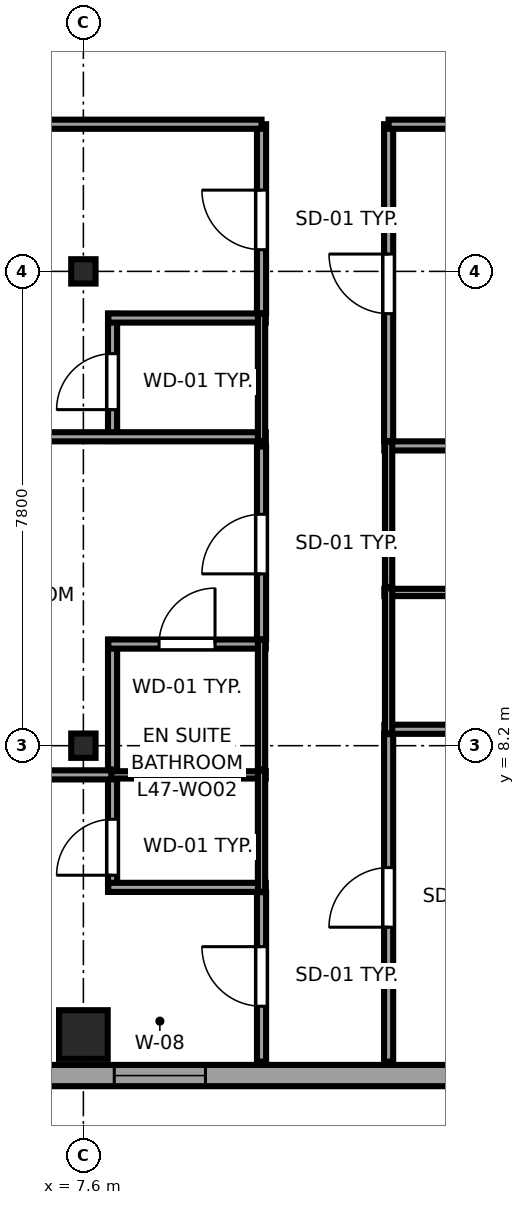
"""IFC4 building model, lengths in metres.
Left out: names, types, materials, properties, quantities, classifications, styles, units other than length and angle.
Written with IfcOpenShell. Run it as: python <this file> out.ifc"""

import sys

from ifc_helpers import new_model, si_unit, direction, frame, frame_2d, origin, origin_2d, place, context, subcontext, project, spatial, rectangle, i_section, extrude, source, transform, mapped, element, fill, save


model = new_model("IFC4")
c1 = context("Model", 3, precision=1e-05, world=origin(), true_north=direction((0.0, 1.0)))
c2 = subcontext(c1, "Body", "Model", "MODEL_VIEW")
j1 = project(units=[si_unit("LENGTHUNIT", "METRE"), si_unit("PLANEANGLEUNIT", "RADIAN")], contexts=[c1])
p1 = place(None, origin())
s1 = spatial("IfcSite", under=j1, at=p1, CompositionType="ELEMENT")
p2 = place(p1, origin())
s2 = spatial("IfcBuilding", under=s1, at=p2, CompositionType="ELEMENT")
p3 = place(p2, frame((0.0, 0.0, 179.0)))
s3 = spatial("IfcBuildingStorey", under=s2, at=p3, CompositionType="ELEMENT", Elevation=179.0)
m1 = source(origin(), c2, "Body", "SweptSolid", [
    extrude(rectangle(XDim=0.8, YDim=0.8, at=origin_2d()), origin(), (0.0, 0.0, 1.0), 3.55),
])
p4 = place(p3, frame((7.6, 3.45, 0.0), z_axis=(0.0, 0.0, 1.0), x_axis=(1.0, 0.0, 0.0)))
e1 = element("IfcColumn", 1, at=p4, inside=s3, PredefinedType="COLUMN", context=c2, shape_type="MappedRepresentation", body=[
    mapped(m1, transform((0.0, 0.0, 0.0), x_axis=(1.0, 0.0, 0.0), y_axis=(0.0, 1.0, 0.0), z_axis=(0.0, 0.0, 1.0), scale=1.0)),
])
m2 = source(origin(), c2, "Body", "SweptSolid", [
    extrude(i_section(OverallWidth=0.4, OverallDepth=0.4, WebThickness=0.02, FlangeThickness=0.035, at=origin_2d()), origin(), (0.0, 0.0, 1.0), 3.55),
])
for number, where, z_axis, x_axis in (
    (2, (7.6, 8.2, 0.0), (0.0, 0.0, 1.0), (1.0, 0.0, 0.0)),
    (3, (7.6, 16.0, 0.0), (0.0, 0.0, 1.0), (1.0, 0.0, 0.0)),
):
    element("IfcColumn", number, at=place(p3, frame(where, z_axis=z_axis, x_axis=x_axis)), inside=s3, PredefinedType="COLUMN", context=c2, shape_type="MappedRepresentation", body=[
        mapped(m2, transform((0.0, 0.0, 0.0), x_axis=(1.0, 0.0, 0.0), y_axis=(0.0, 1.0, 0.0), z_axis=(0.0, 0.0, 1.0), scale=1.0)),
    ])
p5 = place(p3, frame((7.017, 2.775, 0.0), z_axis=(0.0, 0.0, 1.0), x_axis=(1.0, 0.0, 0.0)))
e4 = element("IfcWall", 4, at=p5, inside=s3, PredefinedType="SOLIDWALL", context=c2, shape_type="SweptSolid", body=[
    extrude(rectangle(XDim=15.608, YDim=0.35, at=frame_2d((7.804, 0.0))), origin(), (0.0, 0.0, 1.0), 3.25),
])
p6 = place(p5, frame((11.407, 0.0, 0.68)))
e5 = element("IfcOpeningElement", 5, at=p6, cuts=e4, PredefinedType="OPENING", context=c2, shape_type="SweptSolid", body=[
    extrude(rectangle(XDim=2.4, YDim=1.9, at=frame_2d((1.2, 0.95))), frame((0.0, 0.185, 0.0), z_axis=(0.0, -1.0, 0.0), x_axis=(1.0, 0.0, 0.0)), (0.0, 0.0, 1.0), 0.37),
])
p7 = place(p5, frame((1.091, 0.0, 0.62)))
e6 = element("IfcOpeningElement", 6, at=p7, cuts=e4, PredefinedType="OPENING", context=c2, shape_type="SweptSolid", body=[
    extrude(rectangle(XDim=1.5, YDim=1.55, at=frame_2d((0.75, 0.775))), frame((0.0, 0.185, 0.0), z_axis=(0.0, -1.0, 0.0), x_axis=(1.0, 0.0, 0.0)), (0.0, 0.0, 1.0), 0.37),
])
p8 = place(p3, frame((8.08, 5.8, 0.0), z_axis=(0.0, 0.0, 1.0), x_axis=(0.0, 1.0, 0.0)))
e7 = element("IfcWall", 7, at=p8, inside=s3, PredefinedType="PARTITIONING", context=c2, shape_type="SweptSolid", body=[
    extrude(rectangle(XDim=1.99, YDim=0.15, at=frame_2d((0.995, 0.0))), origin(), (0.0, 0.0, 1.0), 3.25),
])
p9 = place(p8, frame((0.27, 0.0, 0.0)))
e8 = element("IfcOpeningElement", 8, at=p9, cuts=e7, PredefinedType="OPENING", context=c2, shape_type="SweptSolid", body=[
    extrude(rectangle(XDim=0.92, YDim=2.01, at=frame_2d((0.46, 1.005))), frame((0.0, 0.085, 0.0), z_axis=(0.0, -1.0, 0.0), x_axis=(1.0, 0.0, 0.0)), (0.0, 0.0, 1.0), 0.17),
])
p10 = place(p3, frame((8.01, 5.87, 0.0), z_axis=(0.0, 0.0, 1.0), x_axis=(1.0, 0.0, 0.0)))
e9 = element("IfcWall", 9, at=p10, inside=s3, PredefinedType="PARTITIONING", context=c2, shape_type="SweptSolid", body=[
    extrude(rectangle(XDim=2.59, YDim=0.15, at=frame_2d((1.295, 0.0))), origin(), (0.0, 0.0, 1.0), 3.25),
])
p11 = place(p3, frame((8.01, 7.72, 0.0), z_axis=(0.0, 0.0, 1.0), x_axis=(1.0, 0.0, 0.0)))
e10 = element("IfcWall", 10, at=p11, inside=s3, PredefinedType="PLUMBINGWALL", context=c2, shape_type="SweptSolid", body=[
    extrude(rectangle(XDim=2.59, YDim=0.12, at=frame_2d((1.295, 0.0))), origin(), (0.0, 0.0, 1.0), 3.25),
])
p12 = place(p3, frame((10.53, 5.8, 0.0), z_axis=(0.0, 0.0, 1.0), x_axis=(0.0, 1.0, 0.0)))
e11 = element("IfcWall", 11, at=p12, inside=s3, PredefinedType="PLUMBINGWALL", context=c2, shape_type="SweptSolid", body=[
    extrude(rectangle(XDim=1.99, YDim=0.12, at=frame_2d((0.995, 0.0))), origin(), (0.0, 0.0, 1.0), 3.25),
])
p13 = place(p3, frame((8.08, 7.81, 0.0), z_axis=(0.0, 0.0, 1.0), x_axis=(0.0, 1.0, 0.0)))
e12 = element("IfcWall", 12, at=p13, inside=s3, PredefinedType="PARTITIONING", context=c2, shape_type="SweptSolid", body=[
    extrude(rectangle(XDim=2.131, YDim=0.15, at=frame_2d((1.065, 0.0))), origin(), (0.0, 0.0, 1.0), 3.25),
])
p14 = place(p3, frame((8.01, 9.871, 0.0), z_axis=(0.0, 0.0, 1.0), x_axis=(1.0, 0.0, 0.0)))
e13 = element("IfcWall", 13, at=p14, inside=s3, PredefinedType="PARTITIONING", context=c2, shape_type="SweptSolid", body=[
    extrude(rectangle(XDim=2.59, YDim=0.15, at=frame_2d((1.295, 0.0))), origin(), (0.0, 0.0, 1.0), 3.25),
])
p15 = place(p14, frame((0.835, 0.0, 0.0)))
e14 = element("IfcOpeningElement", 14, at=p15, cuts=e13, PredefinedType="OPENING", context=c2, shape_type="SweptSolid", body=[
    extrude(rectangle(XDim=0.92, YDim=2.01, at=frame_2d((0.46, 1.005))), frame((0.0, 0.085, 0.0), z_axis=(0.0, -1.0, 0.0), x_axis=(1.0, 0.0, 0.0)), (0.0, 0.0, 1.0), 0.17),
])
p16 = place(p3, frame((10.53, 7.81, 0.0), z_axis=(0.0, 0.0, 1.0), x_axis=(0.0, 1.0, 0.0)))
e15 = element("IfcWall", 15, at=p16, inside=s3, PredefinedType="PLUMBINGWALL", context=c2, shape_type="SweptSolid", body=[
    extrude(rectangle(XDim=2.131, YDim=0.12, at=frame_2d((1.065, 0.0))), origin(), (0.0, 0.0, 1.0), 3.25),
])
p17 = place(p3, frame((8.08, 13.21, 0.0), z_axis=(0.0, 0.0, 1.0), x_axis=(0.0, 1.0, 0.0)))
e16 = element("IfcWall", 16, at=p17, inside=s3, PredefinedType="PARTITIONING", context=c2, shape_type="SweptSolid", body=[
    extrude(rectangle(XDim=2.093, YDim=0.15, at=frame_2d((1.046, 0.0))), origin(), (0.0, 0.0, 1.0), 3.25),
])
p18 = place(p17, frame((0.517, 0.0, 0.0)))
e17 = element("IfcOpeningElement", 17, at=p18, cuts=e16, PredefinedType="OPENING", context=c2, shape_type="SweptSolid", body=[
    extrude(rectangle(XDim=0.92, YDim=2.01, at=frame_2d((0.46, 1.005))), frame((0.0, 0.085, 0.0), z_axis=(0.0, -1.0, 0.0), x_axis=(1.0, 0.0, 0.0)), (0.0, 0.0, 1.0), 0.17),
])
p19 = place(p3, frame((3.005, 13.28, 0.0), z_axis=(0.0, 0.0, 1.0), x_axis=(1.0, 0.0, 0.0)))
e18 = element("IfcWall", 18, at=p19, inside=s3, PredefinedType="PARTITIONING", context=c2, shape_type="SweptSolid", body=[
    extrude(rectangle(XDim=7.595, YDim=0.15, at=frame_2d((3.798, 0.0))), origin(), (0.0, 0.0, 1.0), 3.25),
])
p20 = place(p3, frame((8.01, 15.233, 0.0), z_axis=(0.0, 0.0, 1.0), x_axis=(1.0, 0.0, 0.0)))
e19 = element("IfcWall", 19, at=p20, inside=s3, PredefinedType="PARTITIONING", context=c2, shape_type="SweptSolid", body=[
    extrude(rectangle(XDim=2.59, YDim=0.15, at=frame_2d((1.295, 0.0))), origin(), (0.0, 0.0, 1.0), 3.25),
])
p21 = place(p3, frame((10.53, 13.21, 0.0), z_axis=(0.0, 0.0, 1.0), x_axis=(0.0, 1.0, 0.0)))
e20 = element("IfcWall", 20, at=p21, inside=s3, PredefinedType="PLUMBINGWALL", context=c2, shape_type="SweptSolid", body=[
    extrude(rectangle(XDim=2.093, YDim=0.12, at=frame_2d((1.046, 0.0))), origin(), (0.0, 0.0, 1.0), 3.25),
])
p22 = place(p3, frame((12.55, 8.47, 0.0), z_axis=(0.0, 0.0, 1.0), x_axis=(1.0, 0.0, 0.0)))
e21 = element("IfcWall", 21, at=p22, inside=s3, PredefinedType="PARTITIONING", context=c2, shape_type="SweptSolid", body=[
    extrude(rectangle(XDim=2.59, YDim=0.15, at=frame_2d((1.295, 0.0))), origin(), (0.0, 0.0, 1.0), 3.25),
])
p23 = place(p3, frame((12.55, 10.72, 0.0), z_axis=(0.0, 0.0, 1.0), x_axis=(1.0, 0.0, 0.0)))
e22 = element("IfcWall", 22, at=p23, inside=s3, PredefinedType="PLUMBINGWALL", context=c2, shape_type="SweptSolid", body=[
    extrude(rectangle(XDim=2.59, YDim=0.12, at=frame_2d((1.295, 0.0))), origin(), (0.0, 0.0, 1.0), 3.25),
])
p24 = place(p3, frame((12.62, 8.4, 0.0), z_axis=(0.0, 0.0, 1.0), x_axis=(0.0, 1.0, 0.0)))
e23 = element("IfcWall", 23, at=p24, inside=s3, PredefinedType="PLUMBINGWALL", context=c2, shape_type="SweptSolid", body=[
    extrude(rectangle(XDim=2.39, YDim=0.12, at=frame_2d((1.195, 0.0))), origin(), (0.0, 0.0, 1.0), 3.25),
])
p25 = place(p3, frame((12.55, 13.13, 0.0), z_axis=(0.0, 0.0, 1.0), x_axis=(1.0, 0.0, 0.0)))
e24 = element("IfcWall", 24, at=p25, inside=s3, PredefinedType="PARTITIONING", context=c2, shape_type="SweptSolid", body=[
    extrude(rectangle(XDim=2.59, YDim=0.15, at=frame_2d((1.295, 0.0))), origin(), (0.0, 0.0, 1.0), 3.25),
])
p26 = place(p3, frame((12.62, 10.81, 0.0), z_axis=(0.0, 0.0, 1.0), x_axis=(0.0, 1.0, 0.0)))
e25 = element("IfcWall", 25, at=p26, inside=s3, PredefinedType="PLUMBINGWALL", context=c2, shape_type="SweptSolid", body=[
    extrude(rectangle(XDim=2.39, YDim=0.12, at=frame_2d((1.195, 0.0))), origin(), (0.0, 0.0, 1.0), 3.25),
])
p27 = place(p3, frame((10.53, 3.005, 0.0), z_axis=(0.0, 0.0, 1.0), x_axis=(0.0, 1.0, 0.0)))
e26 = element("IfcWall", 26, at=p27, inside=s3, PredefinedType="PARTITIONING", context=c2, shape_type="SweptSolid", body=[
    extrude(rectangle(XDim=2.785, YDim=0.15, at=frame_2d((1.393, 0.0))), origin(), (0.0, 0.0, 1.0), 3.25),
])
p28 = place(p27, frame((0.91, 0.0, 0.0)))
e27 = element("IfcOpeningElement", 27, at=p28, cuts=e26, PredefinedType="OPENING", context=c2, shape_type="SweptSolid", body=[
    extrude(rectangle(XDim=0.98, YDim=2.12, at=frame_2d((0.49, 1.06))), frame((0.0, 0.085, 0.0), z_axis=(0.0, -1.0, 0.0), x_axis=(1.0, 0.0, 0.0)), (0.0, 0.0, 1.0), 0.17),
])
p29 = place(p3, frame((3.005, 7.72, 0.0), z_axis=(0.0, 0.0, 1.0), x_axis=(1.0, 0.0, 0.0)))
e28 = element("IfcWall", 28, at=p29, inside=s3, PredefinedType="PARTITIONING", context=c2, shape_type="SweptSolid", body=[
    extrude(rectangle(XDim=5.055, YDim=0.15, at=frame_2d((2.528, 0.0))), origin(), (0.0, 0.0, 1.0), 3.25),
])
p30 = place(p3, frame((10.53, 9.951, 0.0), z_axis=(0.0, 0.0, 1.0), x_axis=(0.0, 1.0, 0.0)))
e29 = element("IfcWall", 29, at=p30, inside=s3, PredefinedType="PARTITIONING", context=c2, shape_type="SweptSolid", body=[
    extrude(rectangle(XDim=3.169, YDim=0.15, at=frame_2d((1.584, 0.0))), origin(), (0.0, 0.0, 1.0), 3.25),
])
p31 = place(p30, frame((1.074, 0.0, 0.0)))
e30 = element("IfcOpeningElement", 30, at=p31, cuts=e29, PredefinedType="OPENING", context=c2, shape_type="SweptSolid", body=[
    extrude(rectangle(XDim=0.98, YDim=2.12, at=frame_2d((0.49, 1.06))), frame((0.0, 0.085, 0.0), z_axis=(0.0, -1.0, 0.0), x_axis=(1.0, 0.0, 0.0)), (0.0, 0.0, 1.0), 0.17),
])
p32 = place(p3, frame((10.53, 15.313, 0.0), z_axis=(0.0, 0.0, 1.0), x_axis=(0.0, 1.0, 0.0)))
e31 = element("IfcWall", 31, at=p32, inside=s3, PredefinedType="PARTITIONING", context=c2, shape_type="SweptSolid", body=[
    extrude(rectangle(XDim=3.107, YDim=0.15, at=frame_2d((1.553, 0.0))), origin(), (0.0, 0.0, 1.0), 3.25),
])
p33 = place(p32, frame((1.043, 0.0, 0.0)))
e32 = element("IfcOpeningElement", 32, at=p33, cuts=e31, PredefinedType="OPENING", context=c2, shape_type="SweptSolid", body=[
    extrude(rectangle(XDim=0.98, YDim=2.12, at=frame_2d((0.49, 1.06))), frame((0.0, 0.085, 0.0), z_axis=(0.0, -1.0, 0.0), x_axis=(1.0, 0.0, 0.0)), (0.0, 0.0, 1.0), 0.17),
])
p34 = place(p3, frame((3.005, 18.42, 0.0), z_axis=(0.0, 0.0, 1.0), x_axis=(1.0, 0.0, 0.0)))
e33 = element("IfcWall", 33, at=p34, inside=s3, PredefinedType="PARTITIONING", context=c2, shape_type="SweptSolid", body=[
    extrude(rectangle(XDim=7.525, YDim=0.15, at=frame_2d((3.763, 0.0))), origin(), (0.0, 0.0, 1.0), 3.25),
])
p35 = place(p3, frame((12.62, 3.005, 0.0), z_axis=(0.0, 0.0, 1.0), x_axis=(0.0, 1.0, 0.0)))
e34 = element("IfcWall", 34, at=p35, inside=s3, PredefinedType="PARTITIONING", context=c2, shape_type="SweptSolid", body=[
    extrude(rectangle(XDim=5.385, YDim=0.15, at=frame_2d((2.692, 0.0))), origin(), (0.0, 0.0, 1.0), 3.25),
])
p36 = place(p35, frame((2.21, 0.0, 0.0)))
e35 = element("IfcOpeningElement", 35, at=p36, cuts=e34, PredefinedType="OPENING", context=c2, shape_type="SweptSolid", body=[
    extrude(rectangle(XDim=0.98, YDim=2.12, at=frame_2d((0.49, 1.06))), frame((0.0, 0.085, 0.0), z_axis=(0.0, -1.0, 0.0), x_axis=(1.0, 0.0, 0.0)), (0.0, 0.0, 1.0), 0.17),
])
p37 = place(p3, frame((12.62, 13.21, 0.0), z_axis=(0.0, 0.0, 1.0), x_axis=(0.0, 1.0, 0.0)))
e36 = element("IfcWall", 36, at=p37, inside=s3, PredefinedType="PARTITIONING", context=c2, shape_type="SweptSolid", body=[
    extrude(rectangle(XDim=5.21, YDim=0.15, at=frame_2d((2.605, 0.0))), origin(), (0.0, 0.0, 1.0), 3.25),
])
p38 = place(p37, frame((2.095, 0.0, 0.0)))
e37 = element("IfcOpeningElement", 37, at=p38, cuts=e36, PredefinedType="OPENING", context=c2, shape_type="SweptSolid", body=[
    extrude(rectangle(XDim=0.98, YDim=2.12, at=frame_2d((0.49, 1.06))), frame((0.0, 0.085, 0.0), z_axis=(0.0, -1.0, 0.0), x_axis=(1.0, 0.0, 0.0)), (0.0, 0.0, 1.0), 0.17),
])
p39 = place(p3, frame((12.62, 18.42, 0.0), z_axis=(0.0, 0.0, 1.0), x_axis=(1.0, 0.0, 0.0)))
e38 = element("IfcWall", 38, at=p39, inside=s3, PredefinedType="PARTITIONING", context=c2, shape_type="SweptSolid", body=[
    extrude(rectangle(XDim=9.73, YDim=0.15, at=frame_2d((4.865, 0.0))), origin(), (0.0, 0.0, 1.0), 3.25),
])
m3 = source(origin(), c2, "Body", "SweptSolid", [
    extrude(rectangle(XDim=1.5, YDim=1.55, at=frame_2d((0.75, 0.775))), frame((0.0, 0.09, 0.0), z_axis=(0.0, -1.0, 0.0), x_axis=(1.0, 0.0, 0.0)), (0.0, 0.0, 1.0), 0.06),
])
p40 = place(p7, origin())
e39 = element("IfcWindow", 39, at=p40, inside=s3, PartitioningType="SINGLE_PANEL", PredefinedType="WINDOW", context=c2, shape_type="MappedRepresentation", body=[
    mapped(m3, transform((0.0, 0.0, 0.0), x_axis=(1.0, 0.0, 0.0), y_axis=(0.0, 1.0, 0.0), z_axis=(0.0, 0.0, 1.0), scale=1.0)),
])
fill(e6, e39)
m4 = source(origin(), c2, "Body", "SweptSolid", [
    extrude(rectangle(XDim=0.92, YDim=2.01, at=frame_2d((0.46, 1.005))), frame((0.0, 0.025, 0.0), z_axis=(0.0, -1.0, 0.0), x_axis=(1.0, 0.0, 0.0)), (0.0, 0.0, 1.0), 0.05),
])
p41 = place(p9, origin())
e40 = element("IfcDoor", 40, at=p41, inside=s3, OperationType="SINGLE_SWING_LEFT", PredefinedType="DOOR", context=c2, shape_type="MappedRepresentation", body=[
    mapped(m4, transform((0.0, 0.0, 0.0), x_axis=(1.0, 0.0, 0.0), y_axis=(0.0, 1.0, 0.0), z_axis=(0.0, 0.0, 1.0), scale=1.0)),
])
fill(e8, e40)
p42 = place(p15, origin())
e41 = element("IfcDoor", 41, at=p42, inside=s3, OperationType="SINGLE_SWING_RIGHT", PredefinedType="DOOR", context=c2, shape_type="MappedRepresentation", body=[
    mapped(m4, transform((0.0, 0.0, 0.0), x_axis=(1.0, 0.0, 0.0), y_axis=(0.0, 1.0, 0.0), z_axis=(0.0, 0.0, 1.0), scale=1.0)),
])
fill(e14, e41)
p43 = place(p18, origin())
e42 = element("IfcDoor", 42, at=p43, inside=s3, OperationType="SINGLE_SWING_LEFT", PredefinedType="DOOR", context=c2, shape_type="MappedRepresentation", body=[
    mapped(m4, transform((0.0, 0.0, 0.0), x_axis=(1.0, 0.0, 0.0), y_axis=(0.0, 1.0, 0.0), z_axis=(0.0, 0.0, 1.0), scale=1.0)),
])
fill(e17, e42)
m5 = source(origin(), c2, "Body", "SweptSolid", [
    extrude(rectangle(XDim=0.98, YDim=2.12, at=frame_2d((0.49, 1.06))), frame((0.0, 0.025, 0.0), z_axis=(0.0, -1.0, 0.0), x_axis=(1.0, 0.0, 0.0)), (0.0, 0.0, 1.0), 0.05),
])
p44 = place(p28, origin())
e43 = element("IfcDoor", 43, at=p44, inside=s3, OperationType="SINGLE_SWING_RIGHT", PredefinedType="DOOR", context=c2, shape_type="MappedRepresentation", body=[
    mapped(m5, transform((0.0, 0.0, 0.0), x_axis=(1.0, 0.0, 0.0), y_axis=(0.0, 1.0, 0.0), z_axis=(0.0, 0.0, 1.0), scale=1.0)),
])
fill(e27, e43)
p45 = place(p31, origin())
e44 = element("IfcDoor", 44, at=p45, inside=s3, OperationType="SINGLE_SWING_LEFT", PredefinedType="DOOR", context=c2, shape_type="MappedRepresentation", body=[
    mapped(m5, transform((0.0, 0.0, 0.0), x_axis=(1.0, 0.0, 0.0), y_axis=(0.0, 1.0, 0.0), z_axis=(0.0, 0.0, 1.0), scale=1.0)),
])
fill(e30, e44)
p46 = place(p33, origin())
e45 = element("IfcDoor", 45, at=p46, inside=s3, OperationType="SINGLE_SWING_RIGHT", PredefinedType="DOOR", context=c2, shape_type="MappedRepresentation", body=[
    mapped(m5, transform((0.0, 0.0, 0.0), x_axis=(1.0, 0.0, 0.0), y_axis=(0.0, 1.0, 0.0), z_axis=(0.0, 0.0, 1.0), scale=1.0)),
])
fill(e32, e45)
p47 = place(p36, origin())
e46 = element("IfcDoor", 46, at=p47, inside=s3, OperationType="SINGLE_SWING_LEFT", PredefinedType="DOOR", context=c2, shape_type="MappedRepresentation", body=[
    mapped(m5, transform((0.0, 0.0, 0.0), x_axis=(1.0, 0.0, 0.0), y_axis=(0.0, 1.0, 0.0), z_axis=(0.0, 0.0, 1.0), scale=1.0)),
])
fill(e35, e46)
p48 = place(p38, origin())
e47 = element("IfcDoor", 47, at=p48, inside=s3, OperationType="SINGLE_SWING_RIGHT", PredefinedType="DOOR", context=c2, shape_type="MappedRepresentation", body=[
    mapped(m5, transform((0.0, 0.0, 0.0), x_axis=(1.0, 0.0, 0.0), y_axis=(0.0, 1.0, 0.0), z_axis=(0.0, 0.0, 1.0), scale=1.0)),
])
fill(e37, e47)
save(model, sys.argv[1])
